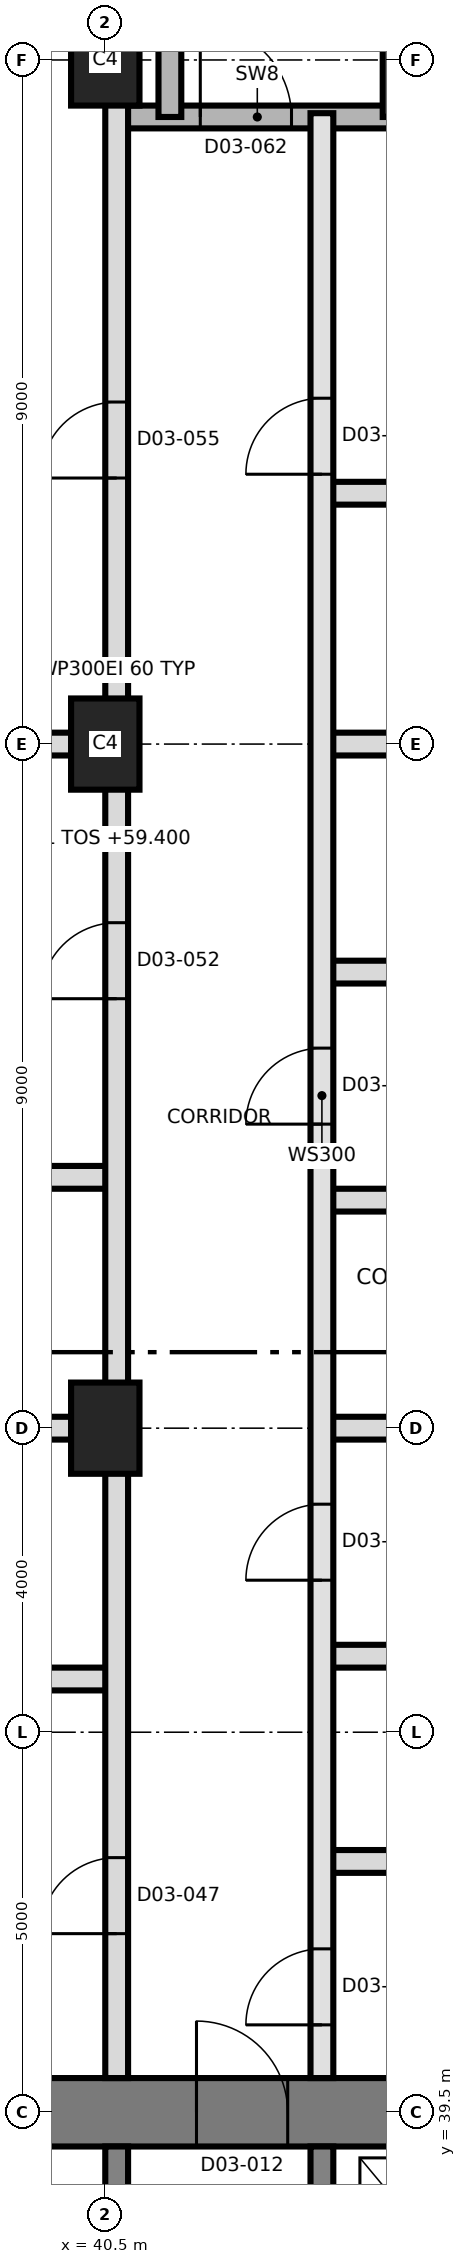
"""IFC4 building model, lengths in metres.
Left out: names, types, materials, properties, quantities, classifications, styles, units other than length and angle.
Written with IfcOpenShell. Run it as: python <this file> out.ifc"""

import sys

from ifc_helpers import new_model, si_unit, direction, frame, frame_2d, origin, origin_2d, place, context, subcontext, project, spatial, rectangle, extrude, element, fill, save


model = new_model("IFC4")
c1 = context("Model", 3, precision=1e-05, world=origin(), true_north=direction((0.0, 1.0)))
c2 = subcontext(c1, "Body", "Model", "MODEL_VIEW")
j1 = project(units=[si_unit("LENGTHUNIT", "METRE"), si_unit("PLANEANGLEUNIT", "RADIAN")], contexts=[c1])
p1 = place(None, origin())
s1 = spatial("IfcSite", under=j1, at=p1, CompositionType="ELEMENT")
p2 = place(p1, origin())
s2 = spatial("IfcBuilding", under=s1, at=p2, CompositionType="ELEMENT")
p3 = place(p2, frame((0.0, 0.0, 59.4)))
s3 = spatial("IfcBuildingStorey", under=s2, at=p3, CompositionType="ELEMENT", Elevation=59.4)
p4 = place(p3, frame((31.05, 39.5, 0.0), z_axis=(0.0, 0.0, 1.0), x_axis=(1.0, 0.0, 0.0)))
e1 = element("IfcWall", 1, at=p4, inside=s3, PredefinedType="SHEAR", context=c2, shape_type="SweptSolid", body=[
    extrude(rectangle(XDim=27.0, YDim=0.9, at=frame_2d((13.5, 0.0))), origin(), (0.0, 0.0, 1.0), 3.7),
])
p5 = place(p4, frame((10.65, 0.0, 0.0)))
e2 = element("IfcOpeningElement", 2, at=p5, cuts=e1, PredefinedType="OPENING", context=c2, shape_type="SweptSolid", body=[
    extrude(rectangle(XDim=1.2, YDim=2.1, at=frame_2d((0.6, 1.05))), frame((0.0, 0.46, 0.0), z_axis=(0.0, -1.0, 0.0), x_axis=(1.0, 0.0, 0.0)), (0.0, 0.0, 1.0), 0.92),
])
for number, where, z_axis, x_axis in (
    (3, (40.65, 33.5, 0.0), (0.0, 0.0, 1.0), (0.0, 1.0, 0.0)),
    (4, (43.35, 33.5, 0.0), (0.0, 0.0, 1.0), (0.0, 1.0, 0.0)),
):
    element("IfcWall", number, at=place(p3, frame(where, z_axis=z_axis, x_axis=x_axis)), inside=s3, PredefinedType="SHEAR", context=c2, shape_type="SweptSolid", body=[
        extrude(rectangle(XDim=5.55, YDim=0.3, at=frame_2d((2.775, 0.0))), origin(), (0.0, 0.0, 1.0), 3.7),
    ])
for number, where, z_axis, x_axis in (
    (5, (40.5, 48.5, 0.0), (0.0, 0.0, 1.0), (0.0, 1.0, 0.0)),
    (6, (40.5, 57.5, 0.0), (0.0, 0.0, 1.0), (0.0, 1.0, 0.0)),
    (7, (40.5, 66.5, 0.0), (0.0, 0.0, 1.0), (0.0, 1.0, 0.0)),
):
    element("IfcColumn", number, at=place(p3, frame(where, z_axis=z_axis, x_axis=x_axis)), inside=s3, PredefinedType="COLUMN", context=c2, shape_type="SweptSolid", body=[
        extrude(rectangle(XDim=1.2, YDim=0.9, at=origin_2d()), origin(), (0.0, 0.0, 1.0), 3.7),
    ])
p6 = place(p3, frame((43.35, 42.8, 0.0), z_axis=(0.0, 0.0, 1.0), x_axis=(1.0, 0.0, 0.0)))
e8 = element("IfcWall", 8, at=p6, inside=s3, PredefinedType="PARTITIONING", context=c2, shape_type="SweptSolid", body=[
    extrude(rectangle(XDim=3.2, YDim=0.3, at=frame_2d((1.6, 0.0))), origin(), (0.0, 0.0, 1.0), 3.4),
])
p7 = place(p3, frame((37.15, 45.2, 0.0), z_axis=(0.0, 0.0, 1.0), x_axis=(1.0, 0.0, 0.0)))
e9 = element("IfcWall", 9, at=p7, inside=s3, PredefinedType="PARTITIONING", context=c2, shape_type="SweptSolid", body=[
    extrude(rectangle(XDim=3.5, YDim=0.3, at=frame_2d((1.75, 0.0))), origin(), (0.0, 0.0, 1.0), 3.4),
])
p8 = place(p3, frame((43.35, 45.5, 0.0), z_axis=(0.0, 0.0, 1.0), x_axis=(1.0, 0.0, 0.0)))
e10 = element("IfcWall", 10, at=p8, inside=s3, PredefinedType="PARTITIONING", context=c2, shape_type="SweptSolid", body=[
    extrude(rectangle(XDim=8.125, YDim=0.3, at=frame_2d((4.062, 0.0))), origin(), (0.0, 0.0, 1.0), 3.4),
])
p9 = place(p3, frame((29.705, 48.5, 0.0), z_axis=(0.0, 0.0, 1.0), x_axis=(1.0, 0.0, 0.0)))
e11 = element("IfcWall", 11, at=p9, inside=s3, PredefinedType="PARTITIONING", context=c2, shape_type="SweptSolid", body=[
    extrude(rectangle(XDim=10.945, YDim=0.3, at=frame_2d((5.472, 0.0))), origin(), (0.0, 0.0, 1.0), 3.4),
])
p10 = place(p3, frame((43.35, 48.5, 0.0), z_axis=(0.0, 0.0, 1.0), x_axis=(1.0, 0.0, 0.0)))
e12 = element("IfcWall", 12, at=p10, inside=s3, PredefinedType="PARTITIONING", context=c2, shape_type="SweptSolid", body=[
    extrude(rectangle(XDim=8.125, YDim=0.3, at=frame_2d((4.062, 0.0))), origin(), (0.0, 0.0, 1.0), 3.4),
])
p11 = place(p3, frame((43.35, 51.5, 0.0), z_axis=(0.0, 0.0, 1.0), x_axis=(1.0, 0.0, 0.0)))
e13 = element("IfcWall", 13, at=p11, inside=s3, PredefinedType="PARTITIONING", context=c2, shape_type="SweptSolid", body=[
    extrude(rectangle(XDim=3.3, YDim=0.3, at=frame_2d((1.65, 0.0))), origin(), (0.0, 0.0, 1.0), 3.4),
])
p12 = place(p3, frame((37.15, 51.8, 0.0), z_axis=(0.0, 0.0, 1.0), x_axis=(1.0, 0.0, 0.0)))
e14 = element("IfcWall", 14, at=p12, inside=s3, PredefinedType="PARTITIONING", context=c2, shape_type="SweptSolid", body=[
    extrude(rectangle(XDim=3.5, YDim=0.3, at=frame_2d((1.75, 0.0))), origin(), (0.0, 0.0, 1.0), 3.4),
])
p13 = place(p3, frame((43.35, 54.5, 0.0), z_axis=(0.0, 0.0, 1.0), x_axis=(1.0, 0.0, 0.0)))
e15 = element("IfcWall", 15, at=p13, inside=s3, PredefinedType="PARTITIONING", context=c2, shape_type="SweptSolid", body=[
    extrude(rectangle(XDim=3.3, YDim=0.3, at=frame_2d((1.65, 0.0))), origin(), (0.0, 0.0, 1.0), 3.4),
])
p14 = place(p3, frame((29.705, 57.5, 0.0), z_axis=(0.0, 0.0, 1.0), x_axis=(1.0, 0.0, 0.0)))
e16 = element("IfcWall", 16, at=p14, inside=s3, PredefinedType="PARTITIONING", context=c2, shape_type="SweptSolid", body=[
    extrude(rectangle(XDim=10.945, YDim=0.3, at=frame_2d((5.472, 0.0))), origin(), (0.0, 0.0, 1.0), 3.4),
])
p15 = place(p3, frame((43.35, 57.5, 0.0), z_axis=(0.0, 0.0, 1.0), x_axis=(1.0, 0.0, 0.0)))
e17 = element("IfcWall", 17, at=p15, inside=s3, PredefinedType="PARTITIONING", context=c2, shape_type="SweptSolid", body=[
    extrude(rectangle(XDim=8.125, YDim=0.3, at=frame_2d((4.062, 0.0))), origin(), (0.0, 0.0, 1.0), 3.4),
])
p16 = place(p3, frame((43.35, 60.8, 0.0), z_axis=(0.0, 0.0, 1.0), x_axis=(1.0, 0.0, 0.0)))
e18 = element("IfcWall", 18, at=p16, inside=s3, PredefinedType="PARTITIONING", context=c2, shape_type="SweptSolid", body=[
    extrude(rectangle(XDim=3.5, YDim=0.3, at=frame_2d((1.75, 0.0))), origin(), (0.0, 0.0, 1.0), 3.4),
])
p17 = place(p3, frame((40.65, 65.75, 0.0), z_axis=(0.0, 0.0, 1.0), x_axis=(1.0, 0.0, 0.0)))
e19 = element("IfcWall", 19, at=p17, inside=s3, PredefinedType="SHEAR", context=c2, shape_type="SweptSolid", body=[
    extrude(rectangle(XDim=3.7, YDim=0.3, at=frame_2d((1.85, 0.0))), origin(), (0.0, 0.0, 1.0), 3.4),
])
p18 = place(p17, frame((1.1, 0.0, 0.0)))
e20 = element("IfcOpeningElement", 20, at=p18, cuts=e19, PredefinedType="OPENING", context=c2, shape_type="SweptSolid", body=[
    extrude(rectangle(XDim=1.2, YDim=2.1, at=frame_2d((0.6, 1.05))), frame((0.0, 0.16, 0.0), z_axis=(0.0, -1.0, 0.0), x_axis=(1.0, 0.0, 0.0)), (0.0, 0.0, 1.0), 0.32),
])
p19 = place(p3, frame((40.65, 39.95, 0.0), z_axis=(0.0, 0.0, 1.0), x_axis=(0.0, 1.0, 0.0)))
e21 = element("IfcWall", 21, at=p19, inside=s3, PredefinedType="PARTITIONING", context=c2, shape_type="SweptSolid", body=[
    extrude(rectangle(XDim=37.05, YDim=0.3, at=frame_2d((18.525, 0.0))), origin(), (0.0, 0.0, 1.0), 3.4),
])
p20 = place(p19, frame((1.9, 0.0, 0.0)))
e22 = element("IfcOpeningElement", 22, at=p20, cuts=e21, PredefinedType="OPENING", context=c2, shape_type="SweptSolid", body=[
    extrude(rectangle(XDim=1.0, YDim=2.4, at=frame_2d((0.5, 1.2))), frame((0.0, 0.16, 0.0), z_axis=(0.0, -1.0, 0.0), x_axis=(1.0, 0.0, 0.0)), (0.0, 0.0, 1.0), 0.32),
])
p21 = place(p19, frame((14.2, 0.0, 0.0)))
e23 = element("IfcOpeningElement", 23, at=p21, cuts=e21, PredefinedType="OPENING", context=c2, shape_type="SweptSolid", body=[
    extrude(rectangle(XDim=1.0, YDim=2.4, at=frame_2d((0.5, 1.2))), frame((0.0, 0.16, 0.0), z_axis=(0.0, -1.0, 0.0), x_axis=(1.0, 0.0, 0.0)), (0.0, 0.0, 1.0), 0.32),
])
p22 = place(p19, frame((21.05, 0.0, 0.0)))
e24 = element("IfcOpeningElement", 24, at=p22, cuts=e21, PredefinedType="OPENING", context=c2, shape_type="SweptSolid", body=[
    extrude(rectangle(XDim=1.0, YDim=2.4, at=frame_2d((0.5, 1.2))), frame((0.0, 0.16, 0.0), z_axis=(0.0, -1.0, 0.0), x_axis=(1.0, 0.0, 0.0)), (0.0, 0.0, 1.0), 0.32),
])
p23 = place(p3, frame((41.35, 65.75, 0.0), z_axis=(0.0, 0.0, 1.0), x_axis=(0.0, 1.0, 0.0)))
e25 = element("IfcWall", 25, at=p23, inside=s3, PredefinedType="SHEAR", context=c2, shape_type="SweptSolid", body=[
    extrude(rectangle(XDim=8.85, YDim=0.3, at=frame_2d((4.425, 0.0))), origin(), (0.0, 0.0, 1.0), 3.4),
])
p24 = place(p3, frame((43.35, 39.95, 0.0), z_axis=(0.0, 0.0, 1.0), x_axis=(0.0, 1.0, 0.0)))
e26 = element("IfcWall", 26, at=p24, inside=s3, PredefinedType="SOLIDWALL", context=c2, shape_type="SweptSolid", body=[
    extrude(rectangle(XDim=25.85, YDim=0.3, at=frame_2d((12.925, 0.0))), origin(), (0.0, 0.0, 1.0), 3.4),
])
p25 = place(p24, frame((0.7, 0.0, 0.0)))
e27 = element("IfcOpeningElement", 27, at=p25, cuts=e26, PredefinedType="OPENING", context=c2, shape_type="SweptSolid", body=[
    extrude(rectangle(XDim=1.0, YDim=2.1, at=frame_2d((0.5, 1.05))), frame((0.0, 0.16, 0.0), z_axis=(0.0, -1.0, 0.0), x_axis=(1.0, 0.0, 0.0)), (0.0, 0.0, 1.0), 0.32),
])
p26 = place(p24, frame((6.55, 0.0, 0.0)))
e28 = element("IfcOpeningElement", 28, at=p26, cuts=e26, PredefinedType="OPENING", context=c2, shape_type="SweptSolid", body=[
    extrude(rectangle(XDim=1.0, YDim=2.1, at=frame_2d((0.5, 1.05))), frame((0.0, 0.16, 0.0), z_axis=(0.0, -1.0, 0.0), x_axis=(1.0, 0.0, 0.0)), (0.0, 0.0, 1.0), 0.32),
])
p27 = place(p24, frame((12.55, 0.0, 0.0)))
e29 = element("IfcOpeningElement", 29, at=p27, cuts=e26, PredefinedType="OPENING", context=c2, shape_type="SweptSolid", body=[
    extrude(rectangle(XDim=1.0, YDim=2.4, at=frame_2d((0.5, 1.2))), frame((0.0, 0.16, 0.0), z_axis=(0.0, -1.0, 0.0), x_axis=(1.0, 0.0, 0.0)), (0.0, 0.0, 1.0), 0.32),
])
p28 = place(p24, frame((21.1, 0.0, 0.0)))
e30 = element("IfcOpeningElement", 30, at=p28, cuts=e26, PredefinedType="OPENING", context=c2, shape_type="SweptSolid", body=[
    extrude(rectangle(XDim=1.0, YDim=2.4, at=frame_2d((0.5, 1.2))), frame((0.0, 0.16, 0.0), z_axis=(0.0, -1.0, 0.0), x_axis=(1.0, 0.0, 0.0)), (0.0, 0.0, 1.0), 0.32),
])
p29 = place(p3, frame((44.3, 65.75, 0.0), z_axis=(0.0, 0.0, 1.0), x_axis=(0.0, 1.0, 0.0)))
e31 = element("IfcWall", 31, at=p29, inside=s3, PredefinedType="SHEAR", context=c2, shape_type="SweptSolid", body=[
    extrude(rectangle(XDim=8.85, YDim=0.3, at=frame_2d((4.425, 0.0))), origin(), (0.0, 0.0, 1.0), 3.4),
])
p30 = place(p5, origin())
e32 = element("IfcDoor", 32, at=p30, inside=s3, OperationType="SINGLE_SWING_RIGHT", PredefinedType="DOOR", context=c2, shape_type="SweptSolid", body=[
    extrude(rectangle(XDim=1.2, YDim=2.1, at=frame_2d((0.6, 1.05))), frame((0.0, 0.025, 0.0), z_axis=(0.0, -1.0, 0.0), x_axis=(1.0, 0.0, 0.0)), (0.0, 0.0, 1.0), 0.05),
])
fill(e2, e32)
p31 = place(p25, origin())
e33 = element("IfcDoor", 33, at=p31, inside=s3, OperationType="SINGLE_SWING_RIGHT", PredefinedType="DOOR", context=c2, shape_type="SweptSolid", body=[
    extrude(rectangle(XDim=1.0, YDim=2.1, at=frame_2d((0.5, 1.05))), frame((0.0, 0.025, 0.0), z_axis=(0.0, -1.0, 0.0), x_axis=(1.0, 0.0, 0.0)), (0.0, 0.0, 1.0), 0.05),
])
fill(e27, e33)
p32 = place(p26, origin())
e34 = element("IfcDoor", 34, at=p32, inside=s3, OperationType="SINGLE_SWING_LEFT", PredefinedType="DOOR", context=c2, shape_type="SweptSolid", body=[
    extrude(rectangle(XDim=1.0, YDim=2.1, at=frame_2d((0.5, 1.05))), frame((0.0, 0.025, 0.0), z_axis=(0.0, -1.0, 0.0), x_axis=(1.0, 0.0, 0.0)), (0.0, 0.0, 1.0), 0.05),
])
fill(e28, e34)
p33 = place(p20, origin())
e35 = element("IfcDoor", 35, at=p33, inside=s3, OperationType="SINGLE_SWING_RIGHT", PredefinedType="DOOR", context=c2, shape_type="SweptSolid", body=[
    extrude(rectangle(XDim=1.0, YDim=2.4, at=frame_2d((0.5, 1.2))), frame((0.0, 0.025, 0.0), z_axis=(0.0, -1.0, 0.0), x_axis=(1.0, 0.0, 0.0)), (0.0, 0.0, 1.0), 0.05),
])
fill(e22, e35)
p34 = place(p27, origin())
e36 = element("IfcDoor", 36, at=p34, inside=s3, OperationType="SINGLE_SWING_LEFT", PredefinedType="DOOR", context=c2, shape_type="SweptSolid", body=[
    extrude(rectangle(XDim=1.0, YDim=2.4, at=frame_2d((0.5, 1.2))), frame((0.0, 0.025, 0.0), z_axis=(0.0, -1.0, 0.0), x_axis=(1.0, 0.0, 0.0)), (0.0, 0.0, 1.0), 0.05),
])
fill(e29, e36)
p35 = place(p21, origin())
e37 = element("IfcDoor", 37, at=p35, inside=s3, OperationType="SINGLE_SWING_LEFT", PredefinedType="DOOR", context=c2, shape_type="SweptSolid", body=[
    extrude(rectangle(XDim=1.0, YDim=2.4, at=frame_2d((0.5, 1.2))), frame((0.0, 0.025, 0.0), z_axis=(0.0, -1.0, 0.0), x_axis=(1.0, 0.0, 0.0)), (0.0, 0.0, 1.0), 0.05),
])
fill(e23, e37)
p36 = place(p28, origin())
e38 = element("IfcDoor", 38, at=p36, inside=s3, OperationType="SINGLE_SWING_LEFT", PredefinedType="DOOR", context=c2, shape_type="SweptSolid", body=[
    extrude(rectangle(XDim=1.0, YDim=2.4, at=frame_2d((0.5, 1.2))), frame((0.0, 0.025, 0.0), z_axis=(0.0, -1.0, 0.0), x_axis=(1.0, 0.0, 0.0)), (0.0, 0.0, 1.0), 0.05),
])
fill(e30, e38)
p37 = place(p22, origin())
e39 = element("IfcDoor", 39, at=p37, inside=s3, OperationType="SINGLE_SWING_RIGHT", PredefinedType="DOOR", context=c2, shape_type="SweptSolid", body=[
    extrude(rectangle(XDim=1.0, YDim=2.4, at=frame_2d((0.5, 1.2))), frame((0.0, 0.025, 0.0), z_axis=(0.0, -1.0, 0.0), x_axis=(1.0, 0.0, 0.0)), (0.0, 0.0, 1.0), 0.05),
])
fill(e24, e39)
p38 = place(p18, origin())
e40 = element("IfcDoor", 40, at=p38, inside=s3, OperationType="SINGLE_SWING_RIGHT", PredefinedType="DOOR", context=c2, shape_type="SweptSolid", body=[
    extrude(rectangle(XDim=1.2, YDim=2.1, at=frame_2d((0.6, 1.05))), frame((0.0, 0.025, 0.0), z_axis=(0.0, -1.0, 0.0), x_axis=(1.0, 0.0, 0.0)), (0.0, 0.0, 1.0), 0.05),
])
fill(e20, e40)
save(model, sys.argv[1])
